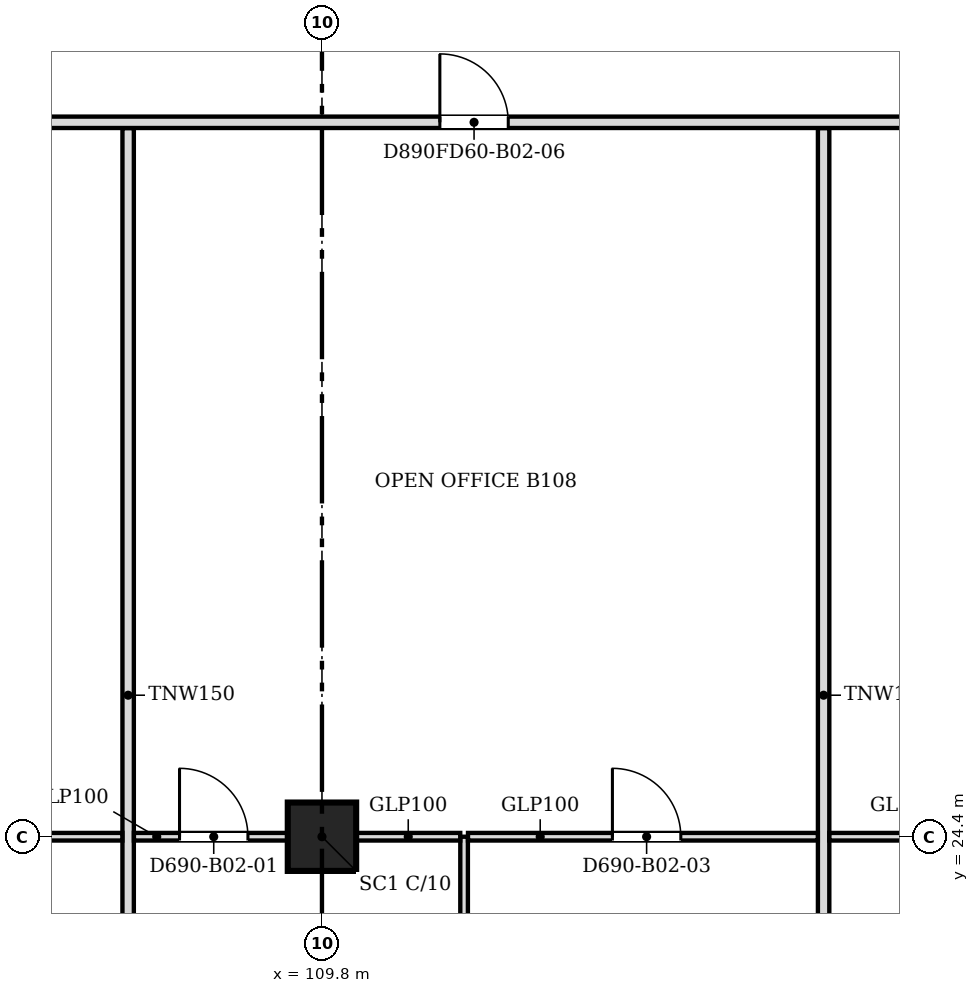
"""IFC4 building model, lengths in metres.
Left out: names, types, materials, properties, quantities, classifications, styles, units other than length and angle.
Written with IfcOpenShell. Run it as: python <this file> out.ifc"""

import sys

from ifc_helpers import new_model, si_unit, direction, frame, frame_2d, origin, origin_2d, place, context, subcontext, project, spatial, rectangle, extrude, source, transform, mapped, element, fill, save


model = new_model("IFC4")
c1 = context("Model", 3, precision=1e-05, world=origin(), true_north=direction((0.0, 1.0)))
c2 = subcontext(c1, "Body", "Model", "MODEL_VIEW")
j1 = project(units=[si_unit("LENGTHUNIT", "METRE"), si_unit("PLANEANGLEUNIT", "RADIAN")], contexts=[c1])
p1 = place(None, origin())
s1 = spatial("IfcSite", under=j1, at=p1, CompositionType="ELEMENT")
p2 = place(p1, origin())
s2 = spatial("IfcBuilding", under=s1, at=p2, CompositionType="ELEMENT")
p3 = place(p2, frame((0.0, 0.0, 21.3)))
s3 = spatial("IfcBuildingStorey", under=s2, at=p3, CompositionType="ELEMENT", Elevation=21.3)
p4 = place(p3, frame((109.8, 24.4, 0.0), z_axis=(0.0, 0.0, 1.0), x_axis=(1.0, 0.0, 0.0)))
e1 = element("IfcColumn", 1, at=p4, inside=s3, PredefinedType="COLUMN", context=c2, shape_type="SweptSolid", body=[
    extrude(rectangle(XDim=0.9, YDim=0.9, at=origin_2d()), origin(), (0.0, 0.0, 1.0), 4.3),
])
p5 = place(p3, frame((107.25, 18.8, 0.0), z_axis=(0.0, 0.0, 1.0), x_axis=(0.0, 1.0, 0.0)))
e2 = element("IfcWall", 2, at=p5, inside=s3, PredefinedType="PARTITIONING", context=c2, shape_type="SweptSolid", body=[
    extrude(rectangle(XDim=14.924, YDim=0.15, at=frame_2d((7.462, 0.0))), origin(), (0.0, 0.0, 1.0), 3.767),
])
p6 = place(p3, frame((111.67, 18.8, 0.0), z_axis=(0.0, 0.0, 1.0), x_axis=(0.0, 1.0, 0.0)))
e3 = element("IfcWall", 3, at=p6, inside=s3, PredefinedType="PARTITIONING", context=c2, shape_type="SweptSolid", body=[
    extrude(rectangle(XDim=5.6, YDim=0.1, at=frame_2d((2.8, 0.0))), origin(), (0.0, 0.0, 1.0), 3.767),
])
p7 = place(p3, frame((116.4, 18.8, 0.0), z_axis=(0.0, 0.0, 1.0), x_axis=(0.0, 1.0, 0.0)))
e4 = element("IfcWall", 4, at=p7, inside=s3, PredefinedType="PARTITIONING", context=c2, shape_type="SweptSolid", body=[
    extrude(rectangle(XDim=14.924, YDim=0.15, at=frame_2d((7.462, 0.0))), origin(), (0.0, 0.0, 1.0), 3.767),
])
p8 = place(p3, frame((107.174, 24.4, 0.0), z_axis=(0.0, 0.0, 1.0), x_axis=(-1.0, 0.0, 0.0)))
e5 = element("IfcWall", 5, at=p8, inside=s3, PredefinedType="PARTITIONING", context=c2, shape_type="SweptSolid", body=[
    extrude(rectangle(XDim=4.861, YDim=0.1, at=frame_2d((2.431, 0.0))), origin(), (0.0, 0.0, 1.0), 3.767),
])
m1 = source(origin(), c2, "Body", "SweptSolid", [
    extrude(rectangle(XDim=0.9, YDim=2.1, at=frame_2d((0.45, 1.05))), frame((0.0, 0.06, 0.0), z_axis=(0.0, -1.0, 0.0), x_axis=(1.0, 0.0, 0.0)), (0.0, 0.0, 1.0), 0.12),
])
p9 = place(p8, frame((1.961, 0.0, 0.0)))
e6 = element("IfcOpeningElement", 6, at=p9, cuts=e5, PredefinedType="OPENING", context=c2, shape_type="MappedRepresentation", body=[
    mapped(m1, transform((0.0, 0.0, 0.0), scale=1.0)),
])
p10 = place(p3, frame((109.349, 24.4, 0.0), z_axis=(0.0, 0.0, 1.0), x_axis=(-1.0, 0.0, 0.0)))
e7 = element("IfcWall", 7, at=p10, inside=s3, PredefinedType="PARTITIONING", context=c2, shape_type="SweptSolid", body=[
    extrude(rectangle(XDim=2.023, YDim=0.1, at=frame_2d((1.012, 0.0))), origin(), (0.0, 0.0, 1.0), 3.767),
])
p11 = place(p10, frame((0.523, 0.0, 0.0)))
e8 = element("IfcOpeningElement", 8, at=p11, cuts=e7, PredefinedType="OPENING", context=c2, shape_type="MappedRepresentation", body=[
    mapped(m1, transform((0.0, 0.0, 0.0), scale=1.0)),
])
p12 = place(p3, frame((110.251, 24.4, 0.0), z_axis=(0.0, 0.0, 1.0), x_axis=(1.0, 0.0, 0.0)))
e9 = element("IfcWall", 9, at=p12, inside=s3, PredefinedType="PARTITIONING", context=c2, shape_type="SweptSolid", body=[
    extrude(rectangle(XDim=1.368, YDim=0.1, at=frame_2d((0.684, 0.0))), origin(), (0.0, 0.0, 1.0), 3.767),
])
p13 = place(p3, frame((116.324, 24.4, 0.0), z_axis=(0.0, 0.0, 1.0), x_axis=(-1.0, 0.0, 0.0)))
e10 = element("IfcWall", 10, at=p13, inside=s3, PredefinedType="PARTITIONING", context=c2, shape_type="SweptSolid", body=[
    extrude(rectangle(XDim=4.603, YDim=0.1, at=frame_2d((2.301, 0.0))), origin(), (0.0, 0.0, 1.0), 3.767),
])
p14 = place(p13, frame((1.803, 0.0, 0.0)))
e11 = element("IfcOpeningElement", 11, at=p14, cuts=e10, PredefinedType="OPENING", context=c2, shape_type="MappedRepresentation", body=[
    mapped(m1, transform((0.0, 0.0, 0.0), scale=1.0)),
])
p15 = place(p3, frame((121.549, 24.4, 0.0), z_axis=(0.0, 0.0, 1.0), x_axis=(-1.0, 0.0, 0.0)))
e12 = element("IfcWall", 12, at=p15, inside=s3, PredefinedType="PARTITIONING", context=c2, shape_type="SweptSolid", body=[
    extrude(rectangle(XDim=5.073, YDim=0.1, at=frame_2d((2.537, 0.0))), origin(), (0.0, 0.0, 1.0), 3.767),
])
p16 = place(p15, frame((2.073, 0.0, 0.0)))
e13 = element("IfcOpeningElement", 13, at=p16, cuts=e12, PredefinedType="OPENING", context=c2, shape_type="MappedRepresentation", body=[
    mapped(m1, transform((0.0, 0.0, 0.0), scale=1.0)),
])
p17 = place(p3, frame((133.7, 33.8, 0.0), z_axis=(0.0, 0.0, 1.0), x_axis=(-1.0, 0.0, 0.0)))
e14 = element("IfcWall", 14, at=p17, inside=s3, PredefinedType="PARTITIONING", context=c2, shape_type="SweptSolid", body=[
    extrude(rectangle(XDim=47.8, YDim=0.15, at=frame_2d((23.9, 0.0))), origin(), (0.0, 0.0, 1.0), 3.767),
])
m2 = source(origin(), c2, "Body", "SweptSolid", [
    extrude(rectangle(XDim=0.9, YDim=2.1, at=frame_2d((0.45, 1.05))), frame((0.0, 0.085, 0.0), z_axis=(0.0, -1.0, 0.0), x_axis=(1.0, 0.0, 0.0)), (0.0, 0.0, 1.0), 0.17),
])
p18 = place(p17, frame((2.099, 0.0, 0.0)))
e15 = element("IfcOpeningElement", 15, at=p18, cuts=e14, PredefinedType="OPENING", context=c2, shape_type="MappedRepresentation", body=[
    mapped(m2, transform((0.0, 0.0, 0.0), scale=1.0)),
])
p19 = place(p17, frame((14.099, 0.0, 0.0)))
e16 = element("IfcOpeningElement", 16, at=p19, cuts=e14, PredefinedType="OPENING", context=c2, shape_type="MappedRepresentation", body=[
    mapped(m2, transform((0.0, 0.0, 0.0), scale=1.0)),
])
p20 = place(p17, frame((8.0, 0.0, 0.0)))
e17 = element("IfcOpeningElement", 17, at=p20, cuts=e14, PredefinedType="OPENING", context=c2, shape_type="MappedRepresentation", body=[
    mapped(m2, transform((0.0, 0.0, 0.0), scale=1.0)),
])
p21 = place(p17, frame((21.449, 0.0, 0.0)))
e18 = element("IfcOpeningElement", 18, at=p21, cuts=e14, PredefinedType="OPENING", context=c2, shape_type="MappedRepresentation", body=[
    mapped(m2, transform((0.0, 0.0, 0.0), scale=1.0)),
])
p22 = place(p17, frame((30.799, 0.0, 0.0)))
e19 = element("IfcOpeningElement", 19, at=p22, cuts=e14, PredefinedType="OPENING", context=c2, shape_type="MappedRepresentation", body=[
    mapped(m2, transform((0.0, 0.0, 0.0), scale=1.0)),
])
p23 = place(p17, frame((41.5, 0.0, 0.0)))
e20 = element("IfcOpeningElement", 20, at=p23, cuts=e14, PredefinedType="OPENING", context=c2, shape_type="MappedRepresentation", body=[
    mapped(m2, transform((0.0, 0.0, 0.0), scale=1.0)),
])
m3 = source(origin(), c2, "Body", "SweptSolid", [
    extrude(rectangle(XDim=0.9, YDim=2.1, at=frame_2d((0.45, 1.05))), frame((0.0, 0.025, 0.0), z_axis=(0.0, -1.0, 0.0), x_axis=(1.0, 0.0, 0.0)), (0.0, 0.0, 1.0), 0.05),
])
p24 = place(p11, origin())
e21 = element("IfcDoor", 21, at=p24, inside=s3, OperationType="SINGLE_SWING_RIGHT", PredefinedType="DOOR", context=c2, shape_type="MappedRepresentation", body=[
    mapped(m3, transform((0.0, 0.0, 0.0), scale=1.0)),
])
fill(e8, e21)
p25 = place(p14, origin())
e22 = element("IfcDoor", 22, at=p25, inside=s3, OperationType="SINGLE_SWING_RIGHT", PredefinedType="DOOR", context=c2, shape_type="MappedRepresentation", body=[
    mapped(m3, transform((0.0, 0.0, 0.0), scale=1.0)),
])
fill(e11, e22)
p26 = place(p21, origin())
e23 = element("IfcDoor", 23, at=p26, inside=s3, OperationType="SINGLE_SWING_RIGHT", PredefinedType="DOOR", context=c2, shape_type="MappedRepresentation", body=[
    mapped(m3, transform((0.0, 0.0, 0.0), scale=1.0)),
])
fill(e18, e23)
save(model, sys.argv[1])
